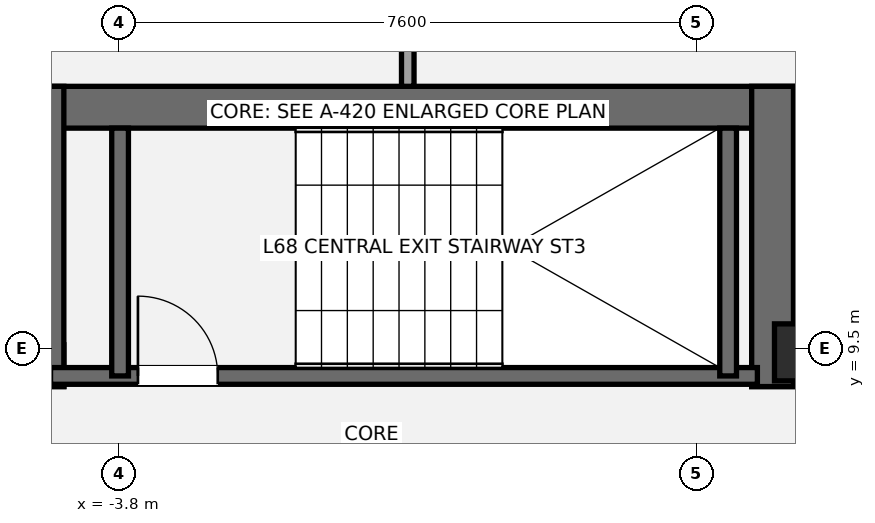
"""IFC4 building model, lengths in metres.
Left out: names, types, materials, properties, quantities, classifications, styles, units other than length and angle.
Written with IfcOpenShell. Run it as: python <this file> out.ifc"""

import sys

from ifc_helpers import new_model, si_unit, direction, frame, frame_2d, origin, origin_2d, place, context, subcontext, project, spatial, rectangle, extrude, element, fill, save


model = new_model("IFC4")
c1 = context("Model", 3, precision=1e-05, world=origin(), true_north=direction((0.0, 1.0)))
c2 = subcontext(c1, "Body", "Model", "MODEL_VIEW")
j1 = project(units=[si_unit("LENGTHUNIT", "METRE"), si_unit("PLANEANGLEUNIT", "RADIAN")], contexts=[c1])
p1 = place(None, origin())
s1 = spatial("IfcSite", under=j1, at=p1, CompositionType="ELEMENT")
p2 = place(p1, origin())
s2 = spatial("IfcBuilding", under=s1, at=p2, CompositionType="ELEMENT")
p3 = place(p2, frame((0.0, 0.0, 241.5)))
s3 = spatial("IfcBuildingStorey", under=s2, at=p3, CompositionType="ELEMENT", Elevation=241.5)
for number, where, z_axis, x_axis in (
    (1, (-13.7, 9.275, 0.0), (0.0, 0.0, 1.0), (1.0, 0.0, 0.0)),
    (2, (4.525, 9.275, 0.0), (0.0, 0.0, 1.0), (1.0, 0.0, 0.0)),
):
    element("IfcWall", number, at=place(p3, frame(where, z_axis=z_axis, x_axis=x_axis)), inside=s3, PredefinedType="SHEAR", context=c2, shape_type="SweptSolid", body=[
        extrude(rectangle(XDim=9.175, YDim=0.55, at=frame_2d((4.587, 0.0))), origin(), (0.0, 0.0, 1.0), 3.15),
    ])
p4 = place(p3, frame((-5.075, 12.675, 0.0), z_axis=(0.0, 0.0, 1.0), x_axis=(1.0, 0.0, 0.0)))
e3 = element("IfcWall", 3, at=p4, inside=s3, PredefinedType="SHEAR", context=c2, shape_type="SweptSolid", body=[
    extrude(rectangle(XDim=10.15, YDim=0.55, at=frame_2d((5.075, 0.0))), origin(), (0.0, 0.0, 1.0), 3.15),
])
for number, where, z_axis, x_axis in (
    (4, (-4.8, 9.0, 0.0), (0.0, 0.0, 1.0), (0.0, 1.0, 0.0)),
    (5, (4.8, 9.0, 0.0), (0.0, 0.0, 1.0), (0.0, 1.0, 0.0)),
):
    element("IfcWall", number, at=place(p3, frame(where, z_axis=z_axis, x_axis=x_axis)), inside=s3, PredefinedType="SHEAR", context=c2, shape_type="SweptSolid", body=[
        extrude(rectangle(XDim=3.95, YDim=0.55, at=frame_2d((1.975, 0.0))), origin(), (0.0, 0.0, 1.0), 3.15),
    ])
p5 = place(p3, frame((-4.7, 9.14, 0.0), z_axis=(0.0, 0.0, 1.0), x_axis=(1.0, 0.0, 0.0)))
e6 = element("IfcWall", 6, at=p5, inside=s3, PredefinedType="SHEAR", context=c2, shape_type="SweptSolid", body=[
    extrude(rectangle(XDim=9.3, YDim=0.22, at=frame_2d((4.65, 0.0))), origin(), (0.0, 0.0, 1.0), 3.15),
])
p6 = place(p5, frame((1.15, 0.0, 0.0)))
e7 = element("IfcOpeningElement", 7, at=p6, cuts=e6, PredefinedType="OPENING", context=c2, shape_type="SweptSolid", body=[
    extrude(rectangle(XDim=1.05, YDim=2.15, at=frame_2d((0.525, 1.075))), frame((0.0, 0.12, 0.0), z_axis=(0.0, -1.0, 0.0), x_axis=(1.0, 0.0, 0.0)), (0.0, 0.0, 1.0), 0.24),
])
for number, where, z_axis, x_axis in (
    (8, (-3.785, 9.14, 0.0), (0.0, 0.0, 1.0), (0.0, 1.0, 0.0)),
    (9, (4.215, 9.14, 0.0), (0.0, 0.0, 1.0), (0.0, 1.0, 0.0)),
):
    element("IfcWall", number, at=place(p3, frame(where, z_axis=z_axis, x_axis=x_axis)), inside=s3, PredefinedType="SHEAR", context=c2, shape_type="SweptSolid", body=[
        extrude(rectangle(XDim=3.26, YDim=0.22, at=frame_2d((1.63, 0.0))), origin(), (0.0, 0.0, 1.0), 3.15),
    ])
p7 = place(p3, frame((5.2, 9.45, 0.0), z_axis=(0.0, 0.0, 1.0), x_axis=(1.0, 0.0, 0.0)))
e10 = element("IfcColumn", 10, at=p7, inside=s3, PredefinedType="PILASTER", context=c2, shape_type="SweptSolid", body=[
    extrude(rectangle(XDim=0.75, YDim=0.75, at=origin_2d()), origin(), (0.0, 0.0, 1.0), 3.15),
])
p8 = place(p3, frame((0.0, 12.95, 0.0), z_axis=(0.0, 0.0, 1.0), x_axis=(0.0, 1.0, 0.0)))
e11 = element("IfcWall", 11, at=p8, inside=s3, PredefinedType="PARTITIONING", context=c2, shape_type="SweptSolid", body=[
    extrude(rectangle(XDim=1.391, YDim=0.165, at=frame_2d((0.695, 0.0))), origin(), (0.0, 0.0, 1.0), 2.97),
])
p9 = place(p6, origin())
e12 = element("IfcDoor", 12, at=p9, inside=s3, OperationType="SINGLE_SWING_LEFT", PredefinedType="DOOR", context=c2, shape_type="SweptSolid", body=[
    extrude(rectangle(XDim=1.05, YDim=2.15, at=frame_2d((0.525, 1.075))), frame((0.0, 0.025, 0.0), z_axis=(0.0, -1.0, 0.0), x_axis=(1.0, 0.0, 0.0)), (0.0, 0.0, 1.0), 0.05),
])
fill(e7, e12)
save(model, sys.argv[1])
